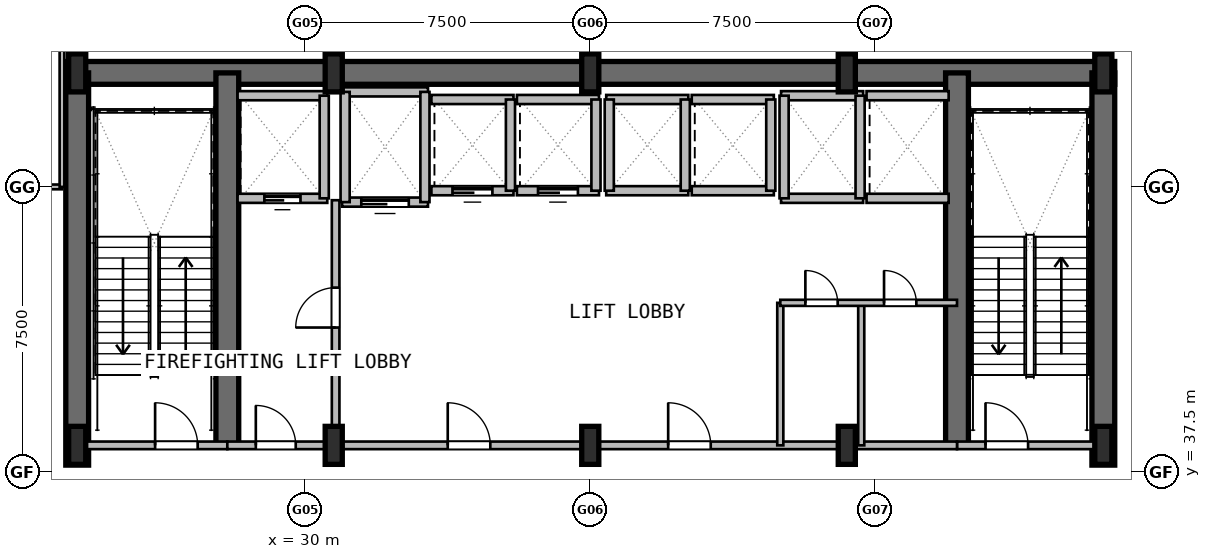
"""IFC4 building model, lengths in metres.
Left out: names, types, materials, properties, quantities, classifications, styles, units other than length and angle.
Written with IfcOpenShell. Run it as: python <this file> out.ifc"""

import sys

from ifc_helpers import new_model, si_unit, direction, frame, frame_2d, origin, origin_2d, place, context, subcontext, project, spatial, rectangle, i_section, extrude, element, fill, save


model = new_model("IFC4")
c1 = context("Model", 3, precision=1e-05, world=origin(), true_north=direction((0.0, 1.0)))
c2 = subcontext(c1, "Body", "Model", "MODEL_VIEW")
j1 = project(units=[si_unit("LENGTHUNIT", "METRE"), si_unit("PLANEANGLEUNIT", "RADIAN")], contexts=[c1])
p1 = place(None, origin())
s1 = spatial("IfcSite", under=j1, at=p1, CompositionType="ELEMENT")
p2 = place(p1, origin())
s2 = spatial("IfcBuilding", under=s1, at=p2, CompositionType="ELEMENT")
p3 = place(p2, frame((0.0, 0.0, 10.8)))
s3 = spatial("IfcBuildingStorey", under=s2, at=p3, CompositionType="ELEMENT", Elevation=10.8)
p4 = place(p3, frame((23.7, 48.0, 0.0), z_axis=(0.0, 0.0, 1.0), x_axis=(1.0, 0.0, 0.0)))
e1 = element("IfcWall", 1, at=p4, inside=s3, PredefinedType="SHEAR", context=c2, shape_type="SweptSolid", body=[
    extrude(rectangle(XDim=27.6, YDim=0.6, at=frame_2d((13.8, 0.0))), origin(), (0.0, 0.0, 1.0), 4.8),
])
for number, where, z_axis, x_axis in (
    (2, (24.0, 37.68, 0.0), (0.0, 0.0, 1.0), (0.0, 1.0, 0.0)),
    (3, (51.0, 37.68, 0.0), (0.0, 0.0, 1.0), (0.0, 1.0, 0.0)),
):
    element("IfcWall", number, at=place(p3, frame(where, z_axis=z_axis, x_axis=x_axis)), inside=s3, PredefinedType="SHEAR", context=c2, shape_type="SweptSolid", body=[
        extrude(rectangle(XDim=10.32, YDim=0.6, at=frame_2d((5.16, 0.0))), origin(), (0.0, 0.0, 1.0), 4.8),
    ])
for number, where, z_axis, x_axis in (
    (4, (27.95, 38.2, 0.0), (0.0, 0.0, 1.0), (0.0, 1.0, 0.0)),
    (5, (47.15, 38.2, 0.0), (0.0, 0.0, 1.0), (0.0, 1.0, 0.0)),
):
    element("IfcWall", number, at=place(p3, frame(where, z_axis=z_axis, x_axis=x_axis)), inside=s3, PredefinedType="SHEAR", context=c2, shape_type="SweptSolid", body=[
        extrude(rectangle(XDim=9.8, YDim=0.6, at=frame_2d((4.9, 0.0))), origin(), (0.0, 0.0, 1.0), 4.8),
    ])
for number, where, z_axis, x_axis in (
    (6, (24.0, 38.2, 0.0), (0.0, 0.0, 1.0), (1.0, 0.0, 0.0)),
    (7, (24.0, 48.0, 0.0), (0.0, 0.0, 1.0), (1.0, 0.0, 0.0)),
    (8, (30.75, 38.2, 0.0), (0.0, 0.0, 1.0), (1.0, 0.0, 0.0)),
    (9, (30.75, 48.0, 0.0), (0.0, 0.0, 1.0), (1.0, 0.0, 0.0)),
    (10, (37.5, 38.2, 0.0), (0.0, 0.0, 1.0), (1.0, 0.0, 0.0)),
    (11, (37.5, 48.0, 0.0), (0.0, 0.0, 1.0), (1.0, 0.0, 0.0)),
    (12, (44.25, 38.2, 0.0), (0.0, 0.0, 1.0), (1.0, 0.0, 0.0)),
    (13, (44.25, 48.0, 0.0), (0.0, 0.0, 1.0), (1.0, 0.0, 0.0)),
    (14, (51.0, 38.2, 0.0), (0.0, 0.0, 1.0), (1.0, 0.0, 0.0)),
    (15, (51.0, 48.0, 0.0), (0.0, 0.0, 1.0), (1.0, 0.0, 0.0)),
):
    element("IfcColumn", number, at=place(p3, frame(where, z_axis=z_axis, x_axis=x_axis)), inside=s3, PredefinedType="COLUMN", context=c2, shape_type="SweptSolid", body=[
        extrude(i_section(OverallWidth=0.45, OverallDepth=1.0, WebThickness=0.022, FlangeThickness=0.04, at=origin_2d()), origin(), (0.0, 0.0, 1.0), 4.8),
    ])
p5 = place(p3, frame((24.0, 38.2, 0.0), z_axis=(0.0, 0.0, 1.0), x_axis=(1.0, 0.0, 0.0)))
e16 = element("IfcWall", 16, at=p5, inside=s3, PredefinedType="PARTITIONING", context=c2, shape_type="SweptSolid", body=[
    extrude(rectangle(XDim=3.95, YDim=0.2, at=frame_2d((1.975, 0.0))), origin(), (0.0, 0.0, 1.0), 3.68),
])
p6 = place(p5, frame((2.05, 0.0, 0.0)))
e17 = element("IfcOpeningElement", 17, at=p6, cuts=e16, PredefinedType="OPENING", context=c2, shape_type="SweptSolid", body=[
    extrude(rectangle(XDim=1.12, YDim=2.1, at=frame_2d((0.56, 1.05))), frame((0.0, 0.11, 0.0), z_axis=(0.0, -1.0, 0.0), x_axis=(1.0, 0.0, 0.0)), (0.0, 0.0, 1.0), 0.22),
])
p7 = place(p3, frame((47.15, 38.2, 0.0), z_axis=(0.0, 0.0, 1.0), x_axis=(1.0, 0.0, 0.0)))
e18 = element("IfcWall", 18, at=p7, inside=s3, PredefinedType="PARTITIONING", context=c2, shape_type="SweptSolid", body=[
    extrude(rectangle(XDim=3.85, YDim=0.2, at=frame_2d((1.925, 0.0))), origin(), (0.0, 0.0, 1.0), 3.68),
])
p8 = place(p7, frame((0.75, 0.0, 0.0)))
e19 = element("IfcOpeningElement", 19, at=p8, cuts=e18, PredefinedType="OPENING", context=c2, shape_type="SweptSolid", body=[
    extrude(rectangle(XDim=1.12, YDim=2.1, at=frame_2d((0.56, 1.05))), frame((0.0, 0.11, 0.0), z_axis=(0.0, -1.0, 0.0), x_axis=(1.0, 0.0, 0.0)), (0.0, 0.0, 1.0), 0.22),
])
p9 = place(p3, frame((30.8, 38.2, 0.0), z_axis=(0.0, 0.0, 1.0), x_axis=(0.0, 1.0, 0.0)))
e20 = element("IfcWall", 20, at=p9, inside=s3, PredefinedType="PARTITIONING", context=c2, shape_type="SweptSolid", body=[
    extrude(rectangle(XDim=6.45, YDim=0.2, at=frame_2d((3.225, 0.0))), origin(), (0.0, 0.0, 1.0), 3.68),
])
p10 = place(p9, frame((3.1, 0.0, 0.0)))
e21 = element("IfcOpeningElement", 21, at=p10, cuts=e20, PredefinedType="OPENING", context=c2, shape_type="SweptSolid", body=[
    extrude(rectangle(XDim=1.05, YDim=2.1, at=frame_2d((0.525, 1.05))), frame((0.0, 0.11, 0.0), z_axis=(0.0, -1.0, 0.0), x_axis=(1.0, 0.0, 0.0)), (0.0, 0.0, 1.0), 0.22),
])
p11 = place(p3, frame((27.95, 38.2, 0.0), z_axis=(0.0, 0.0, 1.0), x_axis=(1.0, 0.0, 0.0)))
e22 = element("IfcWall", 22, at=p11, inside=s3, PredefinedType="PARTITIONING", context=c2, shape_type="SweptSolid", body=[
    extrude(rectangle(XDim=2.85, YDim=0.2, at=frame_2d((1.425, 0.0))), origin(), (0.0, 0.0, 1.0), 3.68),
])
p12 = place(p11, frame((0.75, 0.0, 0.0)))
e23 = element("IfcOpeningElement", 23, at=p12, cuts=e22, PredefinedType="OPENING", context=c2, shape_type="SweptSolid", body=[
    extrude(rectangle(XDim=1.05, YDim=2.1, at=frame_2d((0.525, 1.05))), frame((0.0, 0.11, 0.0), z_axis=(0.0, -1.0, 0.0), x_axis=(1.0, 0.0, 0.0)), (0.0, 0.0, 1.0), 0.22),
])
p13 = place(p3, frame((30.8, 38.2, 0.0), z_axis=(0.0, 0.0, 1.0), x_axis=(1.0, 0.0, 0.0)))
e24 = element("IfcWall", 24, at=p13, inside=s3, PredefinedType="PARTITIONING", context=c2, shape_type="SweptSolid", body=[
    extrude(rectangle(XDim=16.35, YDim=0.2, at=frame_2d((8.175, 0.0))), origin(), (0.0, 0.0, 1.0), 3.68),
])
p14 = place(p13, frame((2.95, 0.0, 0.0)))
e25 = element("IfcOpeningElement", 25, at=p14, cuts=e24, PredefinedType="OPENING", context=c2, shape_type="SweptSolid", body=[
    extrude(rectangle(XDim=1.12, YDim=2.1, at=frame_2d((0.56, 1.05))), frame((0.0, 0.11, 0.0), z_axis=(0.0, -1.0, 0.0), x_axis=(1.0, 0.0, 0.0)), (0.0, 0.0, 1.0), 0.22),
])
p15 = place(p13, frame((8.75, 0.0, 0.0)))
e26 = element("IfcOpeningElement", 26, at=p15, cuts=e24, PredefinedType="OPENING", context=c2, shape_type="SweptSolid", body=[
    extrude(rectangle(XDim=1.12, YDim=2.1, at=frame_2d((0.56, 1.05))), frame((0.0, 0.11, 0.0), z_axis=(0.0, -1.0, 0.0), x_axis=(1.0, 0.0, 0.0)), (0.0, 0.0, 1.0), 0.22),
])
p16 = place(p3, frame((28.22, 44.7, 0.0), z_axis=(0.0, 0.0, 1.0), x_axis=(1.0, 0.0, 0.0)))
e27 = element("IfcWall", 27, at=p16, inside=s3, PredefinedType="PARTITIONING", context=c2, shape_type="SweptSolid", body=[
    extrude(rectangle(XDim=2.36, YDim=0.24, at=frame_2d((1.18, 0.0))), origin(), (0.0, 0.0, 1.0), 4.48),
])
p17 = place(p16, frame((0.705, 0.0, 0.0)))
e28 = element("IfcOpeningElement", 28, at=p17, cuts=e27, PredefinedType="OPENING", context=c2, shape_type="SweptSolid", body=[
    extrude(rectangle(XDim=0.95, YDim=2.15, at=frame_2d((0.475, 1.075))), frame((0.0, 0.13, 0.0), z_axis=(0.0, -1.0, 0.0), x_axis=(1.0, 0.0, 0.0)), (0.0, 0.0, 1.0), 0.26),
])
p18 = place(p3, frame((28.22, 47.4, 0.0), z_axis=(0.0, 0.0, 1.0), x_axis=(1.0, 0.0, 0.0)))
e29 = element("IfcWall", 29, at=p18, inside=s3, PredefinedType="PARTITIONING", context=c2, shape_type="SweptSolid", body=[
    extrude(rectangle(XDim=2.36, YDim=0.24, at=frame_2d((1.18, 0.0))), origin(), (0.0, 0.0, 1.0), 4.48),
])
p19 = place(p3, frame((30.5, 44.7, 0.0), z_axis=(0.0, 0.0, 1.0), x_axis=(0.0, 1.0, 0.0)))
e30 = element("IfcWall", 30, at=p19, inside=s3, PredefinedType="PARTITIONING", context=c2, shape_type="SweptSolid", body=[
    extrude(rectangle(XDim=2.7, YDim=0.24, at=frame_2d((1.35, 0.0))), origin(), (0.0, 0.0, 1.0), 3.68),
])
p20 = place(p3, frame((30.97, 44.6, 0.0), z_axis=(0.0, 0.0, 1.0), x_axis=(1.0, 0.0, 0.0)))
e31 = element("IfcWall", 31, at=p20, inside=s3, PredefinedType="PARTITIONING", context=c2, shape_type="SweptSolid", body=[
    extrude(rectangle(XDim=2.26, YDim=0.24, at=frame_2d((1.13, 0.0))), origin(), (0.0, 0.0, 1.0), 4.48),
])
p21 = place(p20, frame((0.505, 0.0, 0.0)))
e32 = element("IfcOpeningElement", 32, at=p21, cuts=e31, PredefinedType="OPENING", context=c2, shape_type="SweptSolid", body=[
    extrude(rectangle(XDim=1.25, YDim=2.2, at=frame_2d((0.625, 1.1))), frame((0.0, 0.13, 0.0), z_axis=(0.0, -1.0, 0.0), x_axis=(1.0, 0.0, 0.0)), (0.0, 0.0, 1.0), 0.26),
])
p22 = place(p3, frame((30.97, 47.5, 0.0), z_axis=(0.0, 0.0, 1.0), x_axis=(1.0, 0.0, 0.0)))
e33 = element("IfcWall", 33, at=p22, inside=s3, PredefinedType="PARTITIONING", context=c2, shape_type="SweptSolid", body=[
    extrude(rectangle(XDim=2.26, YDim=0.24, at=frame_2d((1.13, 0.0))), origin(), (0.0, 0.0, 1.0), 4.48),
])
p23 = place(p3, frame((31.05, 44.6, 0.0), z_axis=(0.0, 0.0, 1.0), x_axis=(0.0, 1.0, 0.0)))
e34 = element("IfcWall", 34, at=p23, inside=s3, PredefinedType="PARTITIONING", context=c2, shape_type="SweptSolid", body=[
    extrude(rectangle(XDim=2.9, YDim=0.24, at=frame_2d((1.45, 0.0))), origin(), (0.0, 0.0, 1.0), 3.68),
])
p24 = place(p3, frame((33.15, 44.6, 0.0), z_axis=(0.0, 0.0, 1.0), x_axis=(0.0, 1.0, 0.0)))
e35 = element("IfcWall", 35, at=p24, inside=s3, PredefinedType="PARTITIONING", context=c2, shape_type="SweptSolid", body=[
    extrude(rectangle(XDim=2.9, YDim=0.24, at=frame_2d((1.45, 0.0))), origin(), (0.0, 0.0, 1.0), 4.48),
])
p25 = place(p3, frame((33.32, 44.9, 0.0), z_axis=(0.0, 0.0, 1.0), x_axis=(1.0, 0.0, 0.0)))
e36 = element("IfcWall", 36, at=p25, inside=s3, PredefinedType="PARTITIONING", context=c2, shape_type="SweptSolid", body=[
    extrude(rectangle(XDim=2.16, YDim=0.24, at=frame_2d((1.08, 0.0))), origin(), (0.0, 0.0, 1.0), 4.48),
])
p26 = place(p25, frame((0.555, 0.0, 0.0)))
e37 = element("IfcOpeningElement", 37, at=p26, cuts=e36, PredefinedType="OPENING", context=c2, shape_type="SweptSolid", body=[
    extrude(rectangle(XDim=1.05, YDim=2.15, at=frame_2d((0.525, 1.075))), frame((0.0, 0.13, 0.0), z_axis=(0.0, -1.0, 0.0), x_axis=(1.0, 0.0, 0.0)), (0.0, 0.0, 1.0), 0.26),
])
p27 = place(p3, frame((33.32, 47.3, 0.0), z_axis=(0.0, 0.0, 1.0), x_axis=(1.0, 0.0, 0.0)))
e38 = element("IfcWall", 38, at=p27, inside=s3, PredefinedType="PARTITIONING", context=c2, shape_type="SweptSolid", body=[
    extrude(rectangle(XDim=2.16, YDim=0.24, at=frame_2d((1.08, 0.0))), origin(), (0.0, 0.0, 1.0), 4.48),
])
p28 = place(p3, frame((35.4, 44.9, 0.0), z_axis=(0.0, 0.0, 1.0), x_axis=(0.0, 1.0, 0.0)))
e39 = element("IfcWall", 39, at=p28, inside=s3, PredefinedType="PARTITIONING", context=c2, shape_type="SweptSolid", body=[
    extrude(rectangle(XDim=2.4, YDim=0.24, at=frame_2d((1.2, 0.0))), origin(), (0.0, 0.0, 1.0), 4.48),
])
p29 = place(p3, frame((35.57, 44.9, 0.0), z_axis=(0.0, 0.0, 1.0), x_axis=(1.0, 0.0, 0.0)))
e40 = element("IfcWall", 40, at=p29, inside=s3, PredefinedType="PARTITIONING", context=c2, shape_type="SweptSolid", body=[
    extrude(rectangle(XDim=2.16, YDim=0.24, at=frame_2d((1.08, 0.0))), origin(), (0.0, 0.0, 1.0), 4.48),
])
p30 = place(p29, frame((0.555, 0.0, 0.0)))
e41 = element("IfcOpeningElement", 41, at=p30, cuts=e40, PredefinedType="OPENING", context=c2, shape_type="SweptSolid", body=[
    extrude(rectangle(XDim=1.05, YDim=2.15, at=frame_2d((0.525, 1.075))), frame((0.0, 0.13, 0.0), z_axis=(0.0, -1.0, 0.0), x_axis=(1.0, 0.0, 0.0)), (0.0, 0.0, 1.0), 0.26),
])
p31 = place(p3, frame((35.57, 47.3, 0.0), z_axis=(0.0, 0.0, 1.0), x_axis=(1.0, 0.0, 0.0)))
e42 = element("IfcWall", 42, at=p31, inside=s3, PredefinedType="PARTITIONING", context=c2, shape_type="SweptSolid", body=[
    extrude(rectangle(XDim=2.16, YDim=0.24, at=frame_2d((1.08, 0.0))), origin(), (0.0, 0.0, 1.0), 4.48),
])
p32 = place(p3, frame((37.65, 44.9, 0.0), z_axis=(0.0, 0.0, 1.0), x_axis=(0.0, 1.0, 0.0)))
e43 = element("IfcWall", 43, at=p32, inside=s3, PredefinedType="PARTITIONING", context=c2, shape_type="SweptSolid", body=[
    extrude(rectangle(XDim=2.4, YDim=0.24, at=frame_2d((1.2, 0.0))), origin(), (0.0, 0.0, 1.0), 4.48),
])
for number, where, z_axis, x_axis in (
    (44, (37.92, 44.9, 0.0), (0.0, 0.0, 1.0), (1.0, 0.0, 0.0)),
    (45, (37.92, 47.3, 0.0), (0.0, 0.0, 1.0), (1.0, 0.0, 0.0)),
):
    element("IfcWall", number, at=place(p3, frame(where, z_axis=z_axis, x_axis=x_axis)), inside=s3, PredefinedType="PARTITIONING", context=c2, shape_type="SweptSolid", body=[
        extrude(rectangle(XDim=2.16, YDim=0.24, at=frame_2d((1.08, 0.0))), origin(), (0.0, 0.0, 1.0), 4.48),
    ])
for number, where, z_axis, x_axis in (
    (46, (38.0, 44.9, 0.0), (0.0, 0.0, 1.0), (0.0, 1.0, 0.0)),
    (47, (40.0, 44.9, 0.0), (0.0, 0.0, 1.0), (0.0, 1.0, 0.0)),
):
    element("IfcWall", number, at=place(p3, frame(where, z_axis=z_axis, x_axis=x_axis)), inside=s3, PredefinedType="PARTITIONING", context=c2, shape_type="SweptSolid", body=[
        extrude(rectangle(XDim=2.4, YDim=0.24, at=frame_2d((1.2, 0.0))), origin(), (0.0, 0.0, 1.0), 4.48),
    ])
for number, where, z_axis, x_axis in (
    (48, (40.17, 44.9, 0.0), (0.0, 0.0, 1.0), (1.0, 0.0, 0.0)),
    (49, (40.17, 47.3, 0.0), (0.0, 0.0, 1.0), (1.0, 0.0, 0.0)),
):
    element("IfcWall", number, at=place(p3, frame(where, z_axis=z_axis, x_axis=x_axis)), inside=s3, PredefinedType="PARTITIONING", context=c2, shape_type="SweptSolid", body=[
        extrude(rectangle(XDim=2.16, YDim=0.24, at=frame_2d((1.08, 0.0))), origin(), (0.0, 0.0, 1.0), 4.48),
    ])
p33 = place(p3, frame((42.25, 44.9, 0.0), z_axis=(0.0, 0.0, 1.0), x_axis=(0.0, 1.0, 0.0)))
e50 = element("IfcWall", 50, at=p33, inside=s3, PredefinedType="PARTITIONING", context=c2, shape_type="SweptSolid", body=[
    extrude(rectangle(XDim=2.4, YDim=0.24, at=frame_2d((1.2, 0.0))), origin(), (0.0, 0.0, 1.0), 4.48),
])
for number, where, z_axis, x_axis in (
    (51, (42.52, 44.7, 0.0), (0.0, 0.0, 1.0), (1.0, 0.0, 0.0)),
    (52, (42.52, 47.4, 0.0), (0.0, 0.0, 1.0), (1.0, 0.0, 0.0)),
):
    element("IfcWall", number, at=place(p3, frame(where, z_axis=z_axis, x_axis=x_axis)), inside=s3, PredefinedType="PARTITIONING", context=c2, shape_type="SweptSolid", body=[
        extrude(rectangle(XDim=2.16, YDim=0.24, at=frame_2d((1.08, 0.0))), origin(), (0.0, 0.0, 1.0), 4.48),
    ])
for number, where, z_axis, x_axis in (
    (53, (42.6, 44.7, 0.0), (0.0, 0.0, 1.0), (0.0, 1.0, 0.0)),
    (54, (44.6, 44.7, 0.0), (0.0, 0.0, 1.0), (0.0, 1.0, 0.0)),
):
    element("IfcWall", number, at=place(p3, frame(where, z_axis=z_axis, x_axis=x_axis)), inside=s3, PredefinedType="PARTITIONING", context=c2, shape_type="SweptSolid", body=[
        extrude(rectangle(XDim=2.7, YDim=0.24, at=frame_2d((1.35, 0.0))), origin(), (0.0, 0.0, 1.0), 4.48),
    ])
for number, where, z_axis, x_axis in (
    (55, (44.77, 44.7, 0.0), (0.0, 0.0, 1.0), (1.0, 0.0, 0.0)),
    (56, (44.77, 47.4, 0.0), (0.0, 0.0, 1.0), (1.0, 0.0, 0.0)),
):
    element("IfcWall", number, at=place(p3, frame(where, z_axis=z_axis, x_axis=x_axis)), inside=s3, PredefinedType="PARTITIONING", context=c2, shape_type="SweptSolid", body=[
        extrude(rectangle(XDim=2.16, YDim=0.24, at=frame_2d((1.08, 0.0))), origin(), (0.0, 0.0, 1.0), 4.48),
    ])
p34 = place(p3, frame((19.0, 45.0, 0.0), z_axis=(0.0, 0.0, 1.0), x_axis=(1.0, 0.0, 0.0)))
e57 = element("IfcWall", 57, at=p34, inside=s3, PredefinedType="PARTITIONING", context=c2, shape_type="SweptSolid", body=[
    extrude(rectangle(XDim=4.6, YDim=0.125, at=frame_2d((2.3, 0.0))), origin(), (0.0, 0.0, 1.0), 4.48),
])
p35 = place(p34, frame((1.5, 0.0, 0.0)))
e58 = element("IfcOpeningElement", 58, at=p35, cuts=e57, PredefinedType="OPENING", context=c2, shape_type="SweptSolid", body=[
    extrude(rectangle(XDim=0.9, YDim=2.05, at=frame_2d((0.45, 1.025))), frame((0.0, 0.073, 0.0), z_axis=(0.0, -1.0, 0.0), x_axis=(1.0, 0.0, 0.0)), (0.0, 0.0, 1.0), 0.145),
])
p36 = place(p3, frame((23.6, 45.0, 0.0), z_axis=(0.0, 0.0, 1.0), x_axis=(0.0, 1.0, 0.0)))
e59 = element("IfcWall", 59, at=p36, inside=s3, PredefinedType="PARTITIONING", context=c2, shape_type="SweptSolid", body=[
    extrude(rectangle(XDim=4.6, YDim=0.125, at=frame_2d((2.3, 0.0))), origin(), (0.0, 0.0, 1.0), 4.48),
])
for number, where, z_axis, x_axis in (
    (60, (42.5, 38.2, 0.0), (0.0, 0.0, 1.0), (0.0, 1.0, 0.0)),
    (61, (44.63, 38.2, 0.0), (0.0, 0.0, 1.0), (0.0, 1.0, 0.0)),
):
    element("IfcWall", number, at=place(p3, frame(where, z_axis=z_axis, x_axis=x_axis)), inside=s3, PredefinedType="PARTITIONING", context=c2, shape_type="SweptSolid", body=[
        extrude(rectangle(XDim=3.75, YDim=0.16, at=frame_2d((1.875, 0.0))), origin(), (0.0, 0.0, 1.0), 4.48),
    ])
p37 = place(p3, frame((42.5, 41.95, 0.0), z_axis=(0.0, 0.0, 1.0), x_axis=(1.0, 0.0, 0.0)))
e62 = element("IfcWall", 62, at=p37, inside=s3, PredefinedType="PARTITIONING", context=c2, shape_type="SweptSolid", body=[
    extrude(rectangle(XDim=4.65, YDim=0.16, at=frame_2d((2.325, 0.0))), origin(), (0.0, 0.0, 1.0), 4.48),
])
p38 = place(p37, frame((0.66, 0.0, 0.0)))
e63 = element("IfcOpeningElement", 63, at=p38, cuts=e62, PredefinedType="OPENING", context=c2, shape_type="SweptSolid", body=[
    extrude(rectangle(XDim=0.85, YDim=2.05, at=frame_2d((0.425, 1.025))), frame((0.0, 0.09, 0.0), z_axis=(0.0, -1.0, 0.0), x_axis=(1.0, 0.0, 0.0)), (0.0, 0.0, 1.0), 0.18),
])
p39 = place(p37, frame((2.73, 0.0, 0.0)))
e64 = element("IfcOpeningElement", 64, at=p39, cuts=e62, PredefinedType="OPENING", context=c2, shape_type="SweptSolid", body=[
    extrude(rectangle(XDim=0.85, YDim=2.05, at=frame_2d((0.425, 1.025))), frame((0.0, 0.09, 0.0), z_axis=(0.0, -1.0, 0.0), x_axis=(1.0, 0.0, 0.0)), (0.0, 0.0, 1.0), 0.18),
])
p40 = place(p6, origin())
e65 = element("IfcDoor", 65, at=p40, inside=s3, OperationType="SINGLE_SWING_RIGHT", PredefinedType="DOOR", context=c2, shape_type="SweptSolid", body=[
    extrude(rectangle(XDim=1.12, YDim=2.1, at=frame_2d((0.56, 1.05))), frame((0.0, 0.025, 0.0), z_axis=(0.0, -1.0, 0.0), x_axis=(1.0, 0.0, 0.0)), (0.0, 0.0, 1.0), 0.05),
])
fill(e17, e65)
p41 = place(p8, origin())
e66 = element("IfcDoor", 66, at=p41, inside=s3, OperationType="SINGLE_SWING_LEFT", PredefinedType="DOOR", context=c2, shape_type="SweptSolid", body=[
    extrude(rectangle(XDim=1.12, YDim=2.1, at=frame_2d((0.56, 1.05))), frame((0.0, 0.025, 0.0), z_axis=(0.0, -1.0, 0.0), x_axis=(1.0, 0.0, 0.0)), (0.0, 0.0, 1.0), 0.05),
])
fill(e19, e66)
p42 = place(p10, origin())
e67 = element("IfcDoor", 67, at=p42, inside=s3, OperationType="SINGLE_SWING_RIGHT", PredefinedType="DOOR", context=c2, shape_type="SweptSolid", body=[
    extrude(rectangle(XDim=1.05, YDim=2.1, at=frame_2d((0.525, 1.05))), frame((0.0, 0.025, 0.0), z_axis=(0.0, -1.0, 0.0), x_axis=(1.0, 0.0, 0.0)), (0.0, 0.0, 1.0), 0.05),
])
fill(e21, e67)
p43 = place(p12, origin())
e68 = element("IfcDoor", 68, at=p43, inside=s3, OperationType="SINGLE_SWING_LEFT", PredefinedType="DOOR", context=c2, shape_type="SweptSolid", body=[
    extrude(rectangle(XDim=1.05, YDim=2.1, at=frame_2d((0.525, 1.05))), frame((0.0, 0.025, 0.0), z_axis=(0.0, -1.0, 0.0), x_axis=(1.0, 0.0, 0.0)), (0.0, 0.0, 1.0), 0.05),
])
fill(e23, e68)
p44 = place(p14, origin())
e69 = element("IfcDoor", 69, at=p44, inside=s3, OperationType="SINGLE_SWING_RIGHT", PredefinedType="DOOR", context=c2, shape_type="SweptSolid", body=[
    extrude(rectangle(XDim=1.12, YDim=2.1, at=frame_2d((0.56, 1.05))), frame((0.0, 0.025, 0.0), z_axis=(0.0, -1.0, 0.0), x_axis=(1.0, 0.0, 0.0)), (0.0, 0.0, 1.0), 0.05),
])
fill(e25, e69)
p45 = place(p15, origin())
e70 = element("IfcDoor", 70, at=p45, inside=s3, OperationType="SINGLE_SWING_LEFT", PredefinedType="DOOR", context=c2, shape_type="SweptSolid", body=[
    extrude(rectangle(XDim=1.12, YDim=2.1, at=frame_2d((0.56, 1.05))), frame((0.0, 0.025, 0.0), z_axis=(0.0, -1.0, 0.0), x_axis=(1.0, 0.0, 0.0)), (0.0, 0.0, 1.0), 0.05),
])
fill(e26, e70)
p46 = place(p17, origin())
e71 = element("IfcDoor", 71, at=p46, inside=s3, OperationType="SLIDING_TO_LEFT", PredefinedType="DOOR", context=c2, shape_type="SweptSolid", body=[
    extrude(rectangle(XDim=0.95, YDim=2.15, at=frame_2d((0.475, 1.075))), frame((0.0, 0.025, 0.0), z_axis=(0.0, -1.0, 0.0), x_axis=(1.0, 0.0, 0.0)), (0.0, 0.0, 1.0), 0.05),
])
fill(e28, e71)
p47 = place(p21, origin())
e72 = element("IfcDoor", 72, at=p47, inside=s3, OperationType="SLIDING_TO_LEFT", PredefinedType="DOOR", context=c2, shape_type="SweptSolid", body=[
    extrude(rectangle(XDim=1.25, YDim=2.2, at=frame_2d((0.625, 1.1))), frame((0.0, 0.025, 0.0), z_axis=(0.0, -1.0, 0.0), x_axis=(1.0, 0.0, 0.0)), (0.0, 0.0, 1.0), 0.05),
])
fill(e32, e72)
p48 = place(p26, origin())
e73 = element("IfcDoor", 73, at=p48, inside=s3, OperationType="SLIDING_TO_LEFT", PredefinedType="DOOR", context=c2, shape_type="SweptSolid", body=[
    extrude(rectangle(XDim=1.05, YDim=2.15, at=frame_2d((0.525, 1.075))), frame((0.0, 0.025, 0.0), z_axis=(0.0, -1.0, 0.0), x_axis=(1.0, 0.0, 0.0)), (0.0, 0.0, 1.0), 0.05),
])
fill(e37, e73)
p49 = place(p30, origin())
e74 = element("IfcDoor", 74, at=p49, inside=s3, OperationType="SLIDING_TO_LEFT", PredefinedType="DOOR", context=c2, shape_type="SweptSolid", body=[
    extrude(rectangle(XDim=1.05, YDim=2.15, at=frame_2d((0.525, 1.075))), frame((0.0, 0.025, 0.0), z_axis=(0.0, -1.0, 0.0), x_axis=(1.0, 0.0, 0.0)), (0.0, 0.0, 1.0), 0.05),
])
fill(e41, e74)
p50 = place(p38, origin())
e75 = element("IfcDoor", 75, at=p50, inside=s3, OperationType="SINGLE_SWING_RIGHT", PredefinedType="DOOR", context=c2, shape_type="SweptSolid", body=[
    extrude(rectangle(XDim=0.85, YDim=2.05, at=frame_2d((0.425, 1.025))), frame((0.0, 0.025, 0.0), z_axis=(0.0, -1.0, 0.0), x_axis=(1.0, 0.0, 0.0)), (0.0, 0.0, 1.0), 0.05),
])
fill(e63, e75)
p51 = place(p39, origin())
e76 = element("IfcDoor", 76, at=p51, inside=s3, OperationType="SINGLE_SWING_LEFT", PredefinedType="DOOR", context=c2, shape_type="SweptSolid", body=[
    extrude(rectangle(XDim=0.85, YDim=2.05, at=frame_2d((0.425, 1.025))), frame((0.0, 0.025, 0.0), z_axis=(0.0, -1.0, 0.0), x_axis=(1.0, 0.0, 0.0)), (0.0, 0.0, 1.0), 0.05),
])
fill(e64, e76)
save(model, sys.argv[1])
